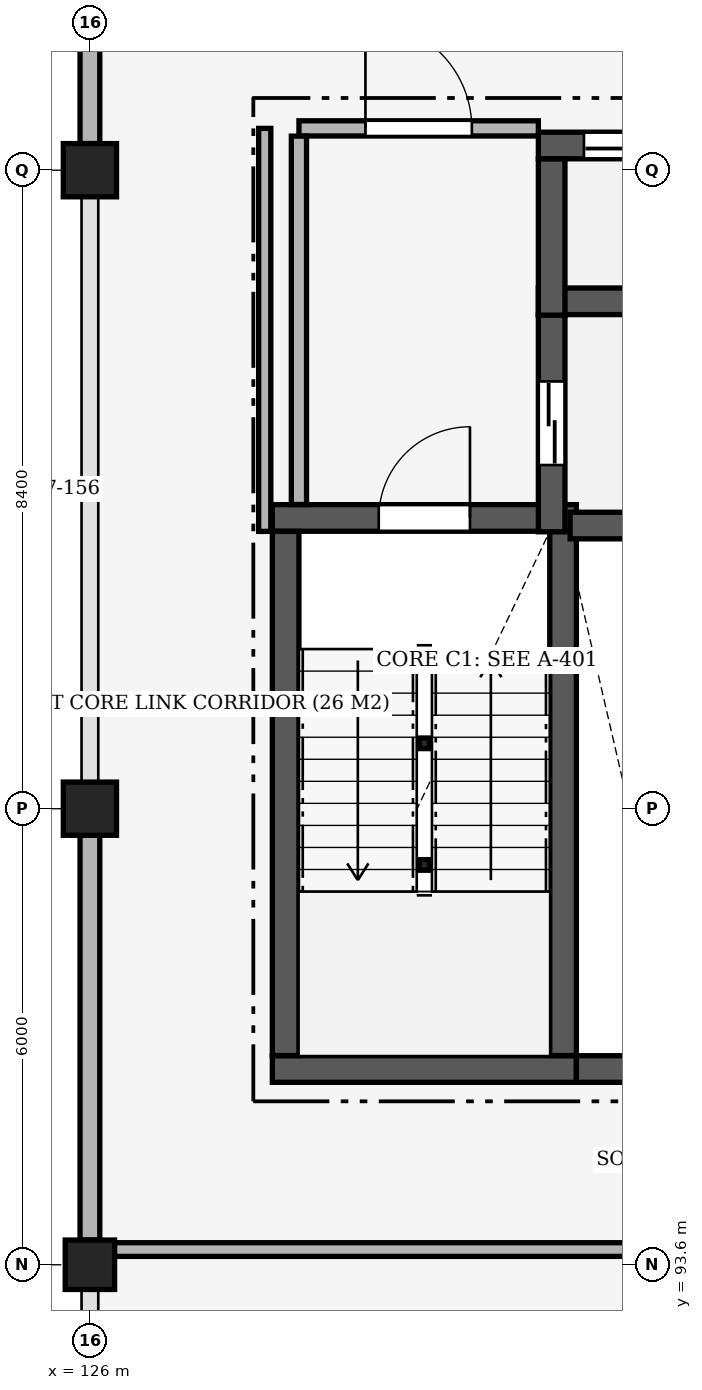
"""IFC4 building model, lengths in metres.
Left out: names, types, materials, properties, quantities, classifications, styles, units other than length and angle.
Written with IfcOpenShell. Run it as: python <this file> out.ifc"""

import sys

from ifc_helpers import new_model, si_unit, direction, frame, frame_2d, origin, origin_2d, place, context, subcontext, project, spatial, rectangle, hollow_circle, extrude, element, fill, save


model = new_model("IFC4")
c1 = context("Model", 3, precision=1e-05, world=origin(), true_north=direction((0.0, 1.0)))
c2 = subcontext(c1, "Body", "Model", "MODEL_VIEW")
j1 = project(units=[si_unit("LENGTHUNIT", "METRE"), si_unit("PLANEANGLEUNIT", "RADIAN")], contexts=[c1])
p1 = place(None, origin())
s1 = spatial("IfcSite", under=j1, at=p1, CompositionType="ELEMENT")
p2 = place(p1, origin())
s2 = spatial("IfcBuilding", under=s1, at=p2, CompositionType="ELEMENT")
p3 = place(p2, frame((0.0, 0.0, 33.6)))
s3 = spatial("IfcBuildingStorey", under=s2, at=p3, CompositionType="ELEMENT", Elevation=33.6)
p4 = place(p3, frame((126.0, 93.6, 0.0), z_axis=(0.0, 0.0, 1.0), x_axis=(1.0, 0.0, 0.0)))
e1 = element("IfcColumn", 1, at=p4, inside=s3, PredefinedType="COLUMN", context=c2, shape_type="SweptSolid", body=[
    extrude(rectangle(XDim=0.65, YDim=0.65, at=origin_2d()), origin(), (0.0, 0.0, 1.0), 4.2),
])
for number, where, z_axis, x_axis in (
    (2, (126.0, 99.6, 0.0), (0.0, 0.0, 1.0), (1.0, 0.0, 0.0)),
    (3, (126.0, 108.0, 0.0), (0.0, 0.0, 1.0), (1.0, 0.0, 0.0)),
):
    element("IfcColumn", number, at=place(p3, frame(where, z_axis=z_axis, x_axis=x_axis)), inside=s3, PredefinedType="COLUMN", context=c2, shape_type="SweptSolid", body=[
        extrude(rectangle(XDim=0.7, YDim=0.7, at=origin_2d()), origin(), (0.0, 0.0, 1.0), 4.2),
    ])
for number, where, z_axis, x_axis in (
    (4, (130.4, 98.86, -2.53), (0.0, 0.0, 1.0), (1.0, 0.0, 0.0)),
    (5, (130.4, 100.46, -2.53), (0.0, 0.0, 1.0), (1.0, 0.0, 0.0)),
):
    element("IfcColumn", number, at=place(p3, frame(where, z_axis=z_axis, x_axis=x_axis)), inside=s3, PredefinedType="COLUMN", context=c2, shape_type="SweptSolid", body=[
        extrude(hollow_circle(Radius=0.07, WallThickness=0.008, at=origin_2d()), origin(), (0.0, 0.0, 1.0), 4.2),
    ])
p5 = place(p3, frame((126.0, 93.925, 0.0), z_axis=(0.0, 0.0, 1.0), x_axis=(0.0, 1.0, 0.0)))
e6 = element("IfcWall", 6, at=p5, inside=s3, PredefinedType="SOLIDWALL", context=c2, shape_type="SweptSolid", body=[
    extrude(rectangle(XDim=5.325, YDim=0.26, at=frame_2d((2.663, 0.0))), origin(), (0.0, 0.0, 1.0), 3.4),
])
p6 = place(p3, frame((126.0, 108.35, 0.0), z_axis=(0.0, 0.0, 1.0), x_axis=(0.0, 1.0, 0.0)))
e7 = element("IfcWall", 7, at=p6, inside=s3, PredefinedType="SOLIDWALL", context=c2, shape_type="SweptSolid", body=[
    extrude(rectangle(XDim=4.7, YDim=0.26, at=frame_2d((2.35, 0.0))), origin(), (0.0, 0.0, 1.0), 3.4),
])
p7 = place(p3, frame((128.4, 103.425, 0.0), z_axis=(0.0, 0.0, 1.0), x_axis=(1.0, 0.0, 0.0)))
e8 = element("IfcWall", 8, at=p7, inside=s3, PredefinedType="SHEAR", context=c2, shape_type="SweptSolid", body=[
    extrude(rectangle(XDim=4.0, YDim=0.35, at=frame_2d((2.0, 0.0))), origin(), (0.0, 0.0, 1.0), 3.95),
])
p8 = place(p7, frame((1.4, 0.0, 0.0)))
e9 = element("IfcOpeningElement", 9, at=p8, cuts=e8, PredefinedType="OPENING", context=c2, shape_type="SweptSolid", body=[
    extrude(rectangle(XDim=1.2, YDim=2.2, at=frame_2d((0.6, 1.1))), frame((0.0, 0.19, 0.0), z_axis=(0.0, -1.0, 0.0), x_axis=(1.0, 0.0, 0.0)), (0.0, 0.0, 1.0), 0.38),
])
p9 = place(p3, frame((128.4, 96.175, 0.0), z_axis=(0.0, 0.0, 1.0), x_axis=(1.0, 0.0, 0.0)))
e10 = element("IfcWall", 10, at=p9, inside=s3, PredefinedType="SHEAR", context=c2, shape_type="SweptSolid", body=[
    extrude(rectangle(XDim=4.0, YDim=0.35, at=frame_2d((2.0, 0.0))), origin(), (0.0, 0.0, 1.0), 3.95),
])
for number, where, z_axis, x_axis in (
    (11, (128.575, 96.352, 0.0), (0.0, 0.0, 1.0), (0.0, 1.0, 0.0)),
    (12, (132.225, 96.352, 0.0), (0.0, 0.0, 1.0), (0.0, 1.0, 0.0)),
):
    element("IfcWall", number, at=place(p3, frame(where, z_axis=z_axis, x_axis=x_axis)), inside=s3, PredefinedType="SHEAR", context=c2, shape_type="SweptSolid", body=[
        extrude(rectangle(XDim=6.896, YDim=0.35, at=frame_2d((3.448, 0.0))), origin(), (0.0, 0.0, 1.0), 3.95),
    ])
p10 = place(p3, frame((132.318, 103.325, 0.0), z_axis=(0.0, 0.0, 1.0), x_axis=(1.0, 0.0, 0.0)))
e13 = element("IfcWall", 13, at=p10, inside=s3, PredefinedType="SHEAR", context=c2, shape_type="SweptSolid", body=[
    extrude(rectangle(XDim=1.882, YDim=0.35, at=frame_2d((0.941, 0.0))), origin(), (0.0, 0.0, 1.0), 3.95),
])
p11 = place(p3, frame((131.9, 106.275, 0.0), z_axis=(0.0, 0.0, 1.0), x_axis=(1.0, 0.0, 0.0)))
e14 = element("IfcWall", 14, at=p11, inside=s3, PredefinedType="SHEAR", context=c2, shape_type="SweptSolid", body=[
    extrude(rectangle(XDim=2.3, YDim=0.35, at=frame_2d((1.15, 0.0))), origin(), (0.0, 0.0, 1.0), 3.95),
])
p12 = place(p3, frame((132.075, 103.243, 0.0), z_axis=(0.0, 0.0, 1.0), x_axis=(0.0, 1.0, 0.0)))
e15 = element("IfcWall", 15, at=p12, inside=s3, PredefinedType="SHEAR", context=c2, shape_type="SweptSolid", body=[
    extrude(rectangle(XDim=2.855, YDim=0.35, at=frame_2d((1.427, 0.0))), origin(), (0.0, 0.0, 1.0), 3.95),
])
p13 = place(p12, frame((0.878, 0.0, 0.0)))
e16 = element("IfcOpeningElement", 16, at=p13, cuts=e15, PredefinedType="OPENING", context=c2, shape_type="SweptSolid", body=[
    extrude(rectangle(XDim=1.1, YDim=2.15, at=frame_2d((0.55, 1.075))), frame((0.0, 0.19, 0.0), z_axis=(0.0, -1.0, 0.0), x_axis=(1.0, 0.0, 0.0)), (0.0, 0.0, 1.0), 0.38),
])
p14 = place(p3, frame((131.9, 108.325, 0.0), z_axis=(0.0, 0.0, 1.0), x_axis=(1.0, 0.0, 0.0)))
e17 = element("IfcWall", 17, at=p14, inside=s3, PredefinedType="SHEAR", context=c2, shape_type="SweptSolid", body=[
    extrude(rectangle(XDim=2.3, YDim=0.35, at=frame_2d((1.15, 0.0))), origin(), (0.0, 0.0, 1.0), 3.95),
])
p15 = place(p14, frame((0.6, 0.0, 0.0)))
e18 = element("IfcOpeningElement", 18, at=p15, cuts=e17, PredefinedType="OPENING", context=c2, shape_type="SweptSolid", body=[
    extrude(rectangle(XDim=1.1, YDim=2.15, at=frame_2d((0.55, 1.075))), frame((0.0, 0.19, 0.0), z_axis=(0.0, -1.0, 0.0), x_axis=(1.0, 0.0, 0.0)), (0.0, 0.0, 1.0), 0.38),
])
p16 = place(p3, frame((132.075, 106.093, 0.0), z_axis=(0.0, 0.0, 1.0), x_axis=(0.0, 1.0, 0.0)))
e19 = element("IfcWall", 19, at=p16, inside=s3, PredefinedType="SHEAR", context=c2, shape_type="SweptSolid", body=[
    extrude(rectangle(XDim=2.055, YDim=0.35, at=frame_2d((1.027, 0.0))), origin(), (0.0, 0.0, 1.0), 3.95),
])
p17 = place(p3, frame((132.4, 96.175, 0.0), z_axis=(0.0, 0.0, 1.0), x_axis=(1.0, 0.0, 0.0)))
e20 = element("IfcWall", 20, at=p17, inside=s3, PredefinedType="SHEAR", context=c2, shape_type="SweptSolid", body=[
    extrude(rectangle(XDim=1.8, YDim=0.35, at=frame_2d((0.9, 0.0))), origin(), (0.0, 0.0, 1.0), 3.95),
])
p18 = place(p3, frame((126.089, 93.8, 0.0), z_axis=(0.0, 0.0, 1.0), x_axis=(1.0, 0.0, 0.0)))
e21 = element("IfcWall", 21, at=p18, inside=s3, PredefinedType="PARTITIONING", context=c2, shape_type="SweptSolid", body=[
    extrude(rectangle(XDim=14.111, YDim=0.18, at=frame_2d((7.055, 0.0))), origin(), (0.0, 0.0, 1.0), 3.25),
])
p19 = place(p3, frame((128.75, 108.55, 0.0), z_axis=(0.0, 0.0, 1.0), x_axis=(1.0, 0.0, 0.0)))
e22 = element("IfcWall", 22, at=p19, inside=s3, PredefinedType="PARTITIONING", context=c2, shape_type="SweptSolid", body=[
    extrude(rectangle(XDim=3.15, YDim=0.2, at=frame_2d((1.575, 0.0))), origin(), (0.0, 0.0, 1.0), 3.95),
])
p20 = place(p19, frame((0.875, 0.0, 0.0)))
e23 = element("IfcOpeningElement", 23, at=p20, cuts=e22, PredefinedType="OPENING", context=c2, shape_type="SweptSolid", body=[
    extrude(rectangle(XDim=1.4, YDim=2.2, at=frame_2d((0.7, 1.1))), frame((0.0, 0.115, 0.0), z_axis=(0.0, -1.0, 0.0), x_axis=(1.0, 0.0, 0.0)), (0.0, 0.0, 1.0), 0.23),
])
p21 = place(p3, frame((128.3, 103.248, 0.0), z_axis=(0.0, 0.0, 1.0), x_axis=(0.0, 1.0, 0.0)))
e24 = element("IfcWall", 24, at=p21, inside=s3, PredefinedType="PARTITIONING", context=c2, shape_type="SweptSolid", body=[
    extrude(rectangle(XDim=5.302, YDim=0.16, at=frame_2d((2.651, 0.0))), origin(), (0.0, 0.0, 1.0), 3.95),
])
p22 = place(p3, frame((128.75, 103.602, 0.0), z_axis=(0.0, 0.0, 1.0), x_axis=(0.0, 1.0, 0.0)))
e25 = element("IfcWall", 25, at=p22, inside=s3, PredefinedType="PARTITIONING", context=c2, shape_type="SweptSolid", body=[
    extrude(rectangle(XDim=4.846, YDim=0.2, at=frame_2d((2.423, 0.0))), origin(), (0.0, 0.0, 1.0), 3.95),
])
p23 = place(p8, origin())
e26 = element("IfcDoor", 26, at=p23, inside=s3, OperationType="SINGLE_SWING_RIGHT", PredefinedType="DOOR", context=c2, shape_type="SweptSolid", body=[
    extrude(rectangle(XDim=1.2, YDim=2.2, at=frame_2d((0.6, 1.1))), frame((0.0, 0.025, 0.0), z_axis=(0.0, -1.0, 0.0), x_axis=(1.0, 0.0, 0.0)), (0.0, 0.0, 1.0), 0.05),
])
fill(e9, e26)
p24 = place(p13, origin())
e27 = element("IfcDoor", 27, at=p24, inside=s3, OperationType="DOUBLE_DOOR_SLIDING", PredefinedType="DOOR", context=c2, shape_type="SweptSolid", body=[
    extrude(rectangle(XDim=1.1, YDim=2.15, at=frame_2d((0.55, 1.075))), frame((0.0, 0.025, 0.0), z_axis=(0.0, -1.0, 0.0), x_axis=(1.0, 0.0, 0.0)), (0.0, 0.0, 1.0), 0.05),
])
fill(e16, e27)
p25 = place(p15, origin())
e28 = element("IfcDoor", 28, at=p25, inside=s3, OperationType="DOUBLE_DOOR_SLIDING", PredefinedType="DOOR", context=c2, shape_type="SweptSolid", body=[
    extrude(rectangle(XDim=1.1, YDim=2.15, at=frame_2d((0.55, 1.075))), frame((0.0, 0.025, 0.0), z_axis=(0.0, -1.0, 0.0), x_axis=(1.0, 0.0, 0.0)), (0.0, 0.0, 1.0), 0.05),
])
fill(e18, e28)
p26 = place(p20, origin())
e29 = element("IfcDoor", 29, at=p26, inside=s3, OperationType="SINGLE_SWING_LEFT", PredefinedType="DOOR", context=c2, shape_type="SweptSolid", body=[
    extrude(rectangle(XDim=1.4, YDim=2.2, at=frame_2d((0.7, 1.1))), frame((0.0, 0.025, 0.0), z_axis=(0.0, -1.0, 0.0), x_axis=(1.0, 0.0, 0.0)), (0.0, 0.0, 1.0), 0.05),
])
fill(e23, e29)
save(model, sys.argv[1])
